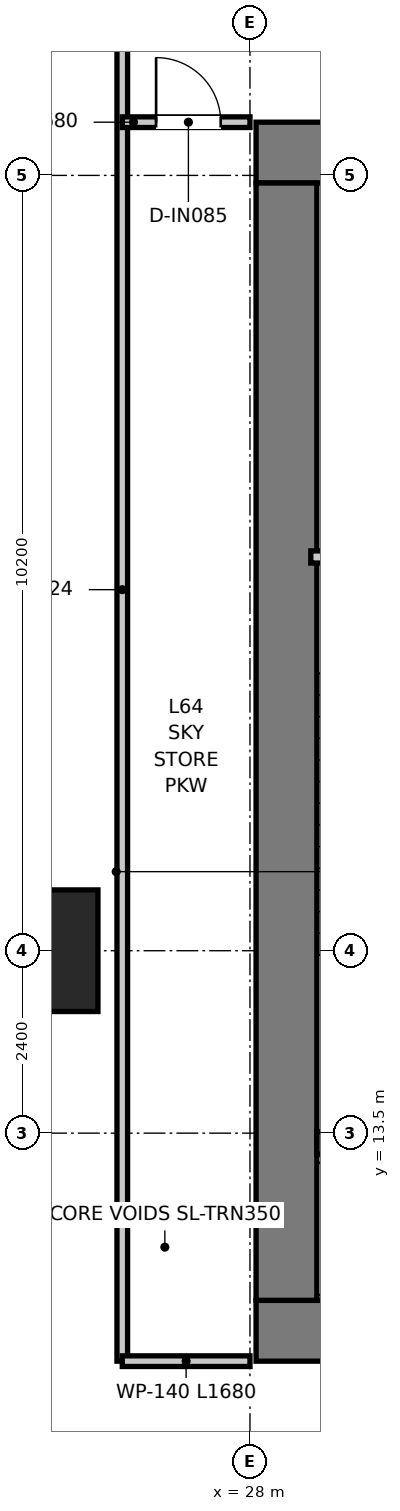
"""IFC4 building model, lengths in metres.
Left out: names, types, materials, properties, quantities, classifications, styles, units other than length and angle.
Written with IfcOpenShell. Run it as: python <this file> out.ifc"""

import sys

from ifc_helpers import new_model, si_unit, direction, frame, frame_2d, origin, origin_2d, place, context, subcontext, project, spatial, rectangle, extrude, source, transform, mapped, element, fill, save


model = new_model("IFC4")
c1 = context("Model", 3, precision=1e-05, world=origin(), true_north=direction((0.0, 1.0)))
c2 = subcontext(c1, "Body", "Model", "MODEL_VIEW")
j1 = project(units=[si_unit("LENGTHUNIT", "METRE"), si_unit("PLANEANGLEUNIT", "RADIAN")], contexts=[c1])
p1 = place(None, origin())
s1 = spatial("IfcSite", under=j1, at=p1, CompositionType="ELEMENT")
p2 = place(p1, origin())
s2 = spatial("IfcBuilding", under=s1, at=p2, CompositionType="ELEMENT")
p3 = place(p2, frame((0.0, 0.0, 262.6)))
s3 = spatial("IfcBuildingStorey", under=s2, at=p3, CompositionType="ELEMENT", Elevation=262.6)
p4 = place(p3, frame((28.08, 10.9, 0.0), z_axis=(0.0, 0.0, 1.0), x_axis=(1.0, 0.0, 0.0)))
e1 = element("IfcWall", 1, at=p4, inside=s3, PredefinedType="SHEAR", context=c2, shape_type="SweptSolid", body=[
    extrude(rectangle(XDim=15.84, YDim=0.8, at=frame_2d((7.92, 0.0))), origin(), (0.0, 0.0, 1.0), 4.8),
])
p5 = place(p3, frame((28.08, 26.4, 0.0), z_axis=(0.0, 0.0, 1.0), x_axis=(1.0, 0.0, 0.0)))
e2 = element("IfcWall", 2, at=p5, inside=s3, PredefinedType="SHEAR", context=c2, shape_type="SweptSolid", body=[
    extrude(rectangle(XDim=15.84, YDim=0.8, at=frame_2d((7.92, 0.0))), origin(), (0.0, 0.0, 1.0), 4.8),
])
p6 = place(p5, frame((7.22, 0.0, 0.0)))
e3 = element("IfcOpeningElement", 3, at=p6, cuts=e2, PredefinedType="OPENING", context=c2, shape_type="SweptSolid", body=[
    extrude(rectangle(XDim=1.4, YDim=2.2, at=frame_2d((0.7, 1.1))), frame((0.0, 0.41, 0.0), z_axis=(0.0, -1.0, 0.0), x_axis=(1.0, 0.0, 0.0)), (0.0, 0.0, 1.0), 0.82),
])
p7 = place(p5, frame((1.775, 0.0, 0.0)))
e4 = element("IfcOpeningElement", 4, at=p7, cuts=e2, PredefinedType="OPENING", context=c2, shape_type="SweptSolid", body=[
    extrude(rectangle(XDim=1.05, YDim=2.1, at=frame_2d((0.525, 1.05))), frame((0.0, 0.41, 0.0), z_axis=(0.0, -1.0, 0.0), x_axis=(1.0, 0.0, 0.0)), (0.0, 0.0, 1.0), 0.82),
])
p8 = place(p5, frame((13.015, 0.0, 0.0)))
e5 = element("IfcOpeningElement", 5, at=p8, cuts=e2, PredefinedType="OPENING", context=c2, shape_type="SweptSolid", body=[
    extrude(rectangle(XDim=1.05, YDim=2.1, at=frame_2d((0.525, 1.05))), frame((0.0, 0.41, 0.0), z_axis=(0.0, -1.0, 0.0), x_axis=(1.0, 0.0, 0.0)), (0.0, 0.0, 1.0), 0.82),
])
p9 = place(p3, frame((28.48, 11.3, 0.0), z_axis=(0.0, 0.0, 1.0), x_axis=(0.0, 1.0, 0.0)))
e6 = element("IfcWall", 6, at=p9, inside=s3, PredefinedType="SHEAR", context=c2, shape_type="SweptSolid", body=[
    extrude(rectangle(XDim=14.7, YDim=0.8, at=frame_2d((7.35, 0.0))), origin(), (0.0, 0.0, 1.0), 4.8),
])
p10 = place(p3, frame((28.88, 13.37, 0.0), z_axis=(0.0, 0.0, 1.0), x_axis=(1.0, 0.0, 0.0)))
e7 = element("IfcWall", 7, at=p10, inside=s3, PredefinedType="SHEAR", context=c2, shape_type="SweptSolid", body=[
    extrude(rectangle(XDim=3.1, YDim=0.3, at=frame_2d((1.55, 0.0))), origin(), (0.0, 0.0, 1.0), 4.8),
])
m1 = source(origin(), c2, "Body", "SweptSolid", [
    extrude(rectangle(XDim=1.6, YDim=1.6, at=origin_2d()), origin(), (0.0, 0.0, 1.0), 4.8),
])
p11 = place(p3, frame((25.2, 15.9, 0.0), z_axis=(0.0, 0.0, 1.0), x_axis=(1.0, 0.0, 0.0)))
e8 = element("IfcColumn", 8, at=p11, inside=s3, PredefinedType="USERDEFINED", context=c2, shape_type="MappedRepresentation", body=[
    mapped(m1, transform((0.0, 0.0, 0.0), x_axis=(1.0, 0.0, 0.0), y_axis=(0.0, 1.0, 0.0), z_axis=(0.0, 0.0, 1.0), scale=1.0)),
])
p12 = place(p3, frame((28.8, 21.08, 0.0), z_axis=(0.0, 0.0, 1.0), x_axis=(1.0, 0.0, 0.0)))
e9 = element("IfcWall", 9, at=p12, inside=s3, PredefinedType="PARTITIONING", context=c2, shape_type="SweptSolid", body=[
    extrude(rectangle(XDim=3.16, YDim=0.16, at=frame_2d((1.58, 0.0))), origin(), (0.0, 0.0, 1.0), 4.52),
])
p13 = place(p12, frame((1.055, 0.0, 0.0)))
e10 = element("IfcOpeningElement", 10, at=p13, cuts=e9, PredefinedType="OPENING", context=c2, shape_type="SweptSolid", body=[
    extrude(rectangle(XDim=1.05, YDim=2.1, at=frame_2d((0.525, 1.05))), frame((0.0, 0.09, 0.0), z_axis=(0.0, -1.0, 0.0), x_axis=(1.0, 0.0, 0.0)), (0.0, 0.0, 1.0), 0.18),
])
p14 = place(p3, frame((26.32, 10.5, 0.0), z_axis=(0.0, 0.0, 1.0), x_axis=(0.0, 1.0, 0.0)))
e11 = element("IfcWall", 11, at=p14, inside=s3, PredefinedType="PARTITIONING", context=c2, shape_type="SweptSolid", body=[
    extrude(rectangle(XDim=34.624, YDim=0.14, at=frame_2d((17.312, 0.0))), origin(), (0.0, 0.0, 1.0), 3.88),
])
p15 = place(p14, frame((20.45, 0.0, 0.0)))
e12 = element("IfcOpeningElement", 12, at=p15, cuts=e11, PredefinedType="OPENING", context=c2, shape_type="SweptSolid", body=[
    extrude(rectangle(XDim=1.1, YDim=2.15, at=frame_2d((0.55, 1.075))), frame((0.0, 0.08, 0.0), z_axis=(0.0, -1.0, 0.0), x_axis=(1.0, 0.0, 0.0)), (0.0, 0.0, 1.0), 0.16),
])
p16 = place(p3, frame((26.32, 26.8, 0.0), z_axis=(0.0, 0.0, 1.0), x_axis=(1.0, 0.0, 0.0)))
e13 = element("IfcWall", 13, at=p16, inside=s3, PredefinedType="PARTITIONING", context=c2, shape_type="SweptSolid", body=[
    extrude(rectangle(XDim=1.68, YDim=0.14, at=frame_2d((0.84, 0.0))), origin(), (0.0, 0.0, 1.0), 4.03),
])
p17 = place(p16, frame((0.445, 0.0, 0.0)))
e14 = element("IfcOpeningElement", 14, at=p17, cuts=e13, PredefinedType="OPENING", context=c2, shape_type="SweptSolid", body=[
    extrude(rectangle(XDim=0.85, YDim=2.1, at=frame_2d((0.425, 1.05))), frame((0.0, 0.08, 0.0), z_axis=(0.0, -1.0, 0.0), x_axis=(1.0, 0.0, 0.0)), (0.0, 0.0, 1.0), 0.16),
])
p18 = place(p3, frame((26.32, 10.5, 0.0), z_axis=(0.0, 0.0, 1.0), x_axis=(1.0, 0.0, 0.0)))
e15 = element("IfcWall", 15, at=p18, inside=s3, PredefinedType="PARTITIONING", context=c2, shape_type="SweptSolid", body=[
    extrude(rectangle(XDim=1.68, YDim=0.14, at=frame_2d((0.84, 0.0))), origin(), (0.0, 0.0, 1.0), 4.52),
])
p19 = place(p17, origin())
e16 = element("IfcDoor", 16, at=p19, inside=s3, OperationType="SINGLE_SWING_LEFT", PredefinedType="DOOR", context=c2, shape_type="SweptSolid", body=[
    extrude(rectangle(XDim=0.85, YDim=2.1, at=frame_2d((0.425, 1.05))), frame((0.0, 0.025, 0.0), z_axis=(0.0, -1.0, 0.0), x_axis=(1.0, 0.0, 0.0)), (0.0, 0.0, 1.0), 0.05),
])
fill(e14, e16)
save(model, sys.argv[1])
